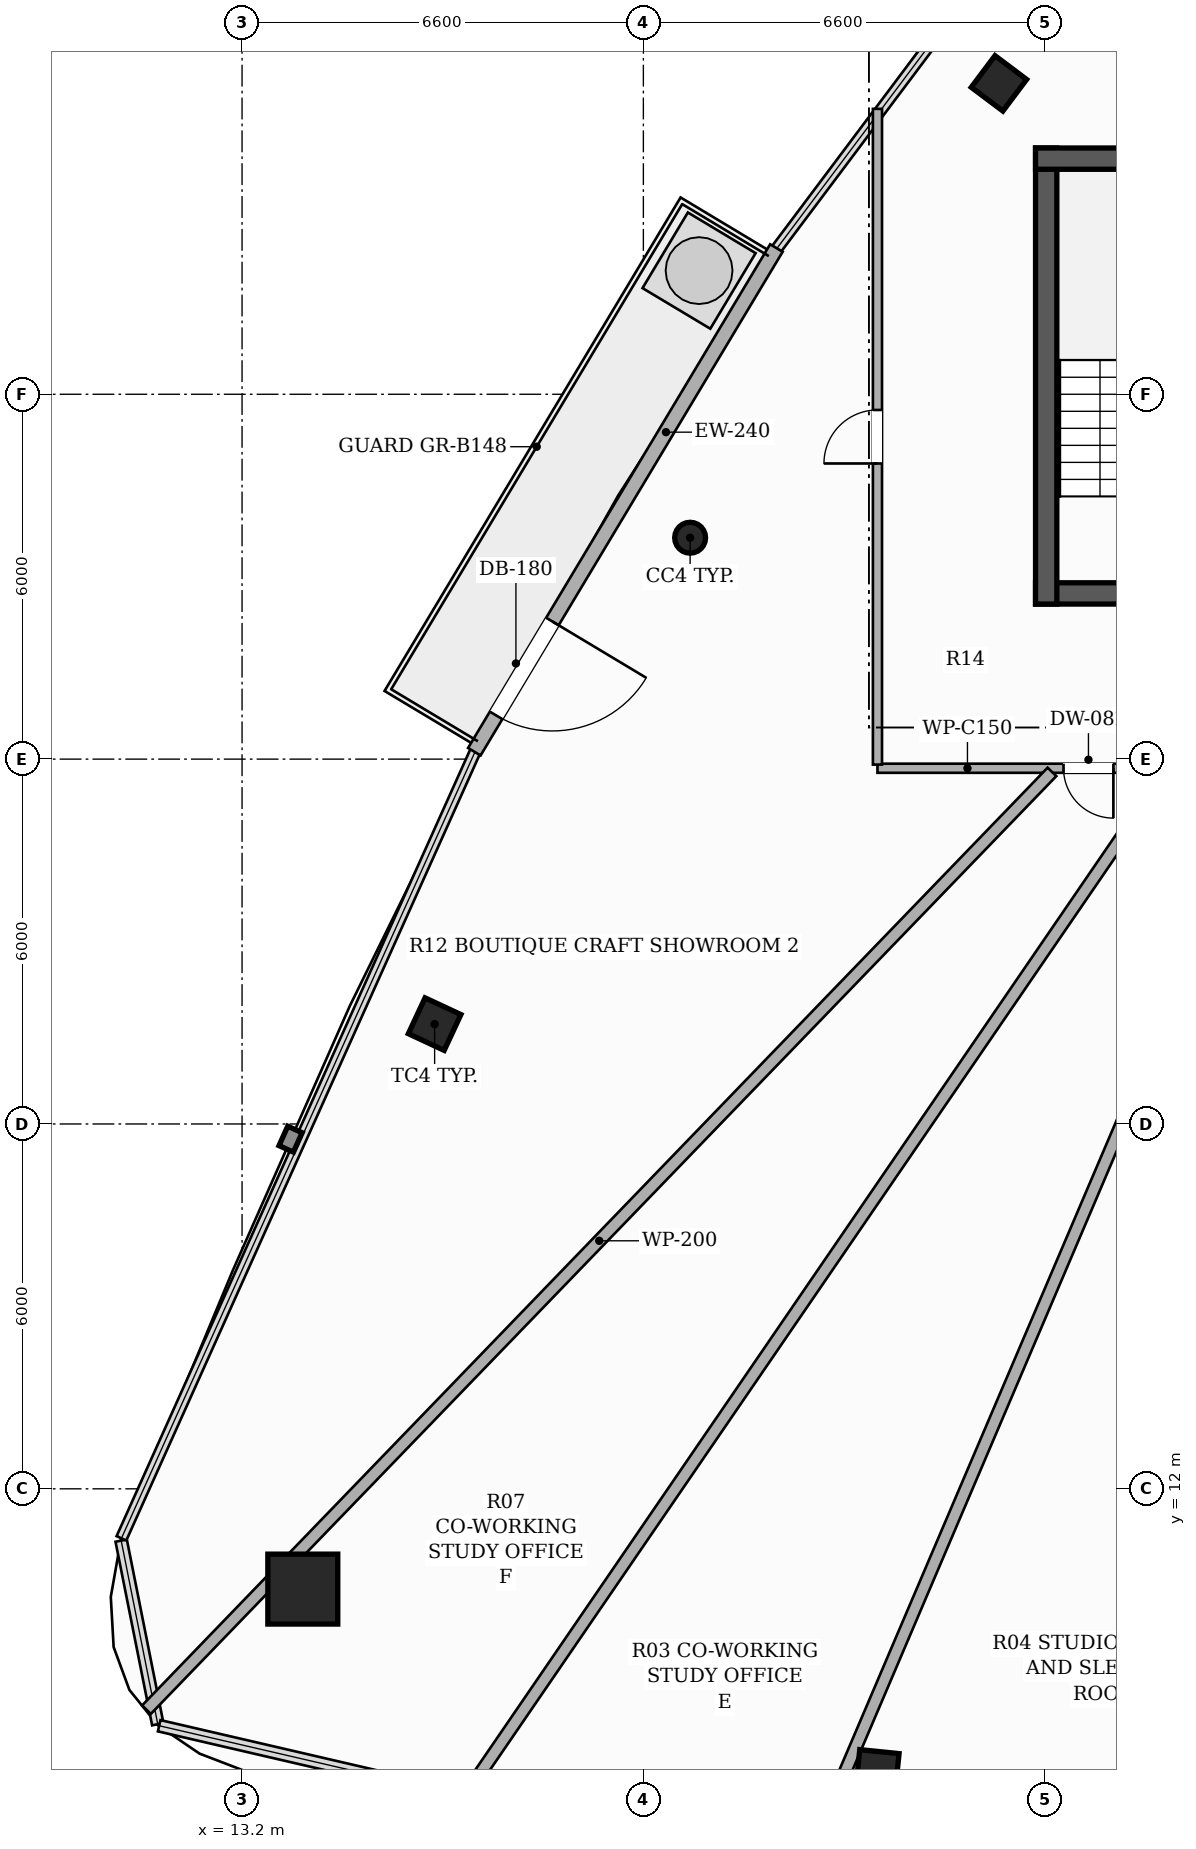
"""IFC4 building model, lengths in metres.
Left out: names, types, materials, properties, quantities, classifications, styles, units other than length and angle.
Written with IfcOpenShell. Run it as: python <this file> out.ifc"""

import sys

from ifc_helpers import new_model, si_unit, direction, frame, frame_2d, origin, origin_2d, place, context, subcontext, project, spatial, rectangle, hollow_rectangle, hollow_circle, extrude, element, fill, save


model = new_model("IFC4")
c1 = context("Model", 3, precision=1e-05, world=origin(), true_north=direction((0.0, 1.0)))
c2 = subcontext(c1, "Body", "Model", "MODEL_VIEW")
j1 = project(units=[si_unit("LENGTHUNIT", "METRE"), si_unit("PLANEANGLEUNIT", "RADIAN")], contexts=[c1])
p1 = place(None, origin())
s1 = spatial("IfcSite", under=j1, at=p1, CompositionType="ELEMENT")
p2 = place(p1, origin())
s2 = spatial("IfcBuilding", under=s1, at=p2, CompositionType="ELEMENT")
p3 = place(p2, frame((0.0, 0.0, 260.15)))
s3 = spatial("IfcBuildingStorey", under=s2, at=p3, CompositionType="ELEMENT", Elevation=260.15)
p4 = place(p3, frame((26.25, 26.725, 0.0), z_axis=(0.0, 0.0, 1.0), x_axis=(1.0, 0.0, 0.0)))
e1 = element("IfcWall", 1, at=p4, inside=s3, PredefinedType="SHEAR", context=c2, shape_type="SweptSolid", body=[
    extrude(rectangle(XDim=13.5, YDim=0.35, at=frame_2d((6.75, 0.0))), origin(), (0.0, 0.0, 1.0), 3.3),
])
p5 = place(p4, frame((4.35, 0.0, 0.0)))
e2 = element("IfcOpeningElement", 2, at=p5, cuts=e1, PredefinedType="OPENING", context=c2, shape_type="SweptSolid", body=[
    extrude(rectangle(XDim=1.05, YDim=2.15, at=frame_2d((0.525, 1.075))), frame((0.0, 0.185, 0.0), z_axis=(0.0, -1.0, 0.0), x_axis=(1.0, 0.0, 0.0)), (0.0, 0.0, 1.0), 0.37),
])
p6 = place(p4, frame((8.3, 0.0, 0.0)))
e3 = element("IfcOpeningElement", 3, at=p6, cuts=e1, PredefinedType="OPENING", context=c2, shape_type="SweptSolid", body=[
    extrude(rectangle(XDim=1.05, YDim=2.15, at=frame_2d((0.525, 1.075))), frame((0.0, 0.185, 0.0), z_axis=(0.0, -1.0, 0.0), x_axis=(1.0, 0.0, 0.0)), (0.0, 0.0, 1.0), 0.37),
])
p7 = place(p3, frame((26.425, 26.55, 0.0), z_axis=(0.0, 0.0, 1.0), x_axis=(0.0, 1.0, 0.0)))
e4 = element("IfcWall", 4, at=p7, inside=s3, PredefinedType="SHEAR", context=c2, shape_type="SweptSolid", body=[
    extrude(rectangle(XDim=7.5, YDim=0.35, at=frame_2d((3.75, 0.0))), origin(), (0.0, 0.0, 1.0), 3.3),
])
p8 = place(p3, frame((26.25, 33.875, 0.0), z_axis=(0.0, 0.0, 1.0), x_axis=(1.0, 0.0, 0.0)))
e5 = element("IfcWall", 5, at=p8, inside=s3, PredefinedType="SHEAR", context=c2, shape_type="SweptSolid", body=[
    extrude(rectangle(XDim=3.6, YDim=0.35, at=frame_2d((1.8, 0.0))), origin(), (0.0, 0.0, 1.0), 3.3),
])
p9 = place(p3, frame((14.199, 10.351, 0.0), z_axis=(0.0, 0.0, 1.0), x_axis=(1.0, 0.0, 0.0)))
e6 = element("IfcColumn", 6, at=p9, inside=s3, PredefinedType="COLUMN", context=c2, shape_type="SweptSolid", body=[
    extrude(hollow_rectangle(XDim=1.15, YDim=1.15, WallThickness=0.036, at=origin_2d()), origin(), (0.0, 0.0, 1.0), 3.3),
])
p10 = place(p3, frame((25.648, 35.113, 0.0), z_axis=(0.0, 0.0, 1.0), x_axis=(0.600420225326, 0.799684658487, 0.0)))
e7 = element("IfcColumn", 7, at=p10, inside=s3, PredefinedType="COLUMN", context=c2, shape_type="SweptSolid", body=[
    extrude(hollow_rectangle(XDim=0.65, YDim=0.65, WallThickness=0.022, at=origin_2d()), origin(), (0.0, 0.0, 1.0), 3.3),
])
p11 = place(p3, frame((20.569, 27.641, 0.0), z_axis=(0.0, 0.0, 1.0), x_axis=(1.0, 0.0, 0.0)))
e8 = element("IfcColumn", 8, at=p11, inside=s3, PredefinedType="COLUMN", context=c2, shape_type="SweptSolid", body=[
    extrude(hollow_circle(Radius=0.254, WallThickness=0.016, at=origin_2d()), origin(), (0.0, 0.0, 1.0), 3.3),
])
for number, where, z_axis, x_axis in (
    (9, (16.367, 19.642, 0.0), (0.0, 0.0, 1.0), (0.423, 0.906, 0.0)),
    (10, (23.649, 7.355, 0.0), (0.0, 0.0, 1.0), (-0.995, 0.101, 0.0)),
):
    element("IfcColumn", number, at=place(p3, frame(where, z_axis=z_axis, x_axis=x_axis)), inside=s3, PredefinedType="COLUMN", context=c2, shape_type="SweptSolid", body=[
        extrude(hollow_rectangle(XDim=0.65, YDim=0.65, WallThickness=0.022, at=origin_2d()), origin(), (0.0, 0.0, 1.0), 3.3),
    ])
p12 = place(p3, frame((21.988, 32.405, 0.0), z_axis=(0.0, 0.0, 1.0), x_axis=(-0.514361929684, -0.857573206958, 0.0)))
e11 = element("IfcWall", 11, at=p12, inside=s3, PredefinedType="SOLIDWALL", context=c2, shape_type="SweptSolid", body=[
    extrude(rectangle(XDim=9.659, YDim=0.24, at=frame_2d((4.829, 0.0))), origin(), (0.0, 0.0, 1.0), 2.624),
])
p13 = place(p12, frame((7.162, 0.0, 0.0)))
e12 = element("IfcOpeningElement", 12, at=p13, cuts=e11, PredefinedType="OPENING", context=c2, shape_type="SweptSolid", body=[
    extrude(rectangle(XDim=1.8, YDim=2.2, at=frame_2d((0.9, 1.1))), frame((0.0, 0.13, 0.0), z_axis=(0.0, -1.0, 0.0), x_axis=(1.0, 0.0, 0.0)), (0.0, 0.0, 1.0), 0.26),
])
p14 = place(p3, frame((32.168, 23.85, 0.0), z_axis=(0.0, 0.0, 1.0), x_axis=(-1.0, 0.0, 0.0)))
e13 = element("IfcWall", 13, at=p14, inside=s3, PredefinedType="PARTITIONING", context=c2, shape_type="SweptSolid", body=[
    extrude(rectangle(XDim=8.518, YDim=0.15, at=frame_2d((4.259, 0.0))), origin(), (0.0, 0.0, 1.0), 2.565),
])
p15 = place(p14, frame((0.894, 0.0, 0.0)))
e14 = element("IfcOpeningElement", 14, at=p15, cuts=e13, PredefinedType="OPENING", context=c2, shape_type="SweptSolid", body=[
    extrude(rectangle(XDim=0.92, YDim=2.15, at=frame_2d((0.46, 1.075))), frame((0.0, 0.085, 0.0), z_axis=(0.0, -1.0, 0.0), x_axis=(1.0, 0.0, 0.0)), (0.0, 0.0, 1.0), 0.17),
])
p16 = place(p14, frame((2.683, 0.0, 0.0)))
e15 = element("IfcOpeningElement", 15, at=p16, cuts=e13, PredefinedType="OPENING", context=c2, shape_type="SweptSolid", body=[
    extrude(rectangle(XDim=0.88, YDim=2.1, at=frame_2d((0.44, 1.05))), frame((0.0, 0.085, 0.0), z_axis=(0.0, -1.0, 0.0), x_axis=(1.0, 0.0, 0.0)), (0.0, 0.0, 1.0), 0.17),
])
p17 = place(p14, frame((4.638, 0.0, 0.0)))
e16 = element("IfcOpeningElement", 16, at=p17, cuts=e13, PredefinedType="OPENING", context=c2, shape_type="SweptSolid", body=[
    extrude(rectangle(XDim=0.82, YDim=2.1, at=frame_2d((0.41, 1.05))), frame((0.0, 0.085, 0.0), z_axis=(0.0, -1.0, 0.0), x_axis=(1.0, 0.0, 0.0)), (0.0, 0.0, 1.0), 0.17),
])
p18 = place(p3, frame((23.65, 23.91, 0.0), z_axis=(0.0, 0.0, 1.0), x_axis=(0.0, 1.0, 0.0)))
e17 = element("IfcWall", 17, at=p18, inside=s3, PredefinedType="PARTITIONING", context=c2, shape_type="SweptSolid", body=[
    extrude(rectangle(XDim=10.784, YDim=0.15, at=frame_2d((5.392, 0.0))), origin(), (0.0, 0.0, 1.0), 2.492),
])
p19 = place(p18, frame((4.952, 0.0, 0.0)))
e18 = element("IfcOpeningElement", 18, at=p19, cuts=e17, PredefinedType="OPENING", context=c2, shape_type="SweptSolid", body=[
    extrude(rectangle(XDim=0.88, YDim=2.1, at=frame_2d((0.44, 1.05))), frame((0.0, 0.085, 0.0), z_axis=(0.0, -1.0, 0.0), x_axis=(1.0, 0.0, 0.0)), (0.0, 0.0, 1.0), 0.17),
])
p20 = place(p3, frame((26.52, 23.79, 0.0), z_axis=(0.0, 0.0, 1.0), x_axis=(-0.694637190704, -0.719360252788, 0.0)))
e19 = element("IfcWall", 19, at=p20, inside=s3, PredefinedType="PARTITIONING", context=c2, shape_type="SweptSolid", body=[
    extrude(rectangle(XDim=21.439, YDim=0.2, at=frame_2d((10.719, 0.0))), origin(), (0.0, 0.0, 1.0), 2.492),
])
p21 = place(p3, frame((22.589, 6.104, 0.0), z_axis=(0.0, 0.0, 1.0), x_axis=(0.392518309842, 0.919744190761, 0.0)))
e20 = element("IfcWall", 20, at=p21, inside=s3, PredefinedType="PARTITIONING", context=c2, shape_type="SweptSolid", body=[
    extrude(rectangle(XDim=19.229, YDim=0.2, at=frame_2d((9.615, 0.0))), origin(), (0.0, 0.0, 1.0), 2.492),
])
p22 = place(p3, frame((16.784, 6.834, 0.0), z_axis=(0.0, 0.0, 1.0), x_axis=(0.565235631435, 0.824929500598, 0.0)))
e21 = element("IfcWall", 21, at=p22, inside=s3, PredefinedType="PARTITIONING", context=c2, shape_type="SweptSolid", body=[
    extrude(rectangle(XDim=20.554, YDim=0.2, at=frame_2d((10.277, 0.0))), origin(), (0.0, 0.0, 1.0), 2.492),
])
p23 = place(p13, origin())
e22 = element("IfcDoor", 22, at=p23, inside=s3, OperationType="SINGLE_SWING_LEFT", PredefinedType="DOOR", context=c2, shape_type="SweptSolid", body=[
    extrude(rectangle(XDim=1.8, YDim=2.2, at=frame_2d((0.9, 1.1))), frame((0.0, 0.025, 0.0), z_axis=(0.0, -1.0, 0.0), x_axis=(1.0, 0.0, 0.0)), (0.0, 0.0, 1.0), 0.05),
])
fill(e12, e22)
p24 = place(p19, origin())
e23 = element("IfcDoor", 23, at=p24, inside=s3, OperationType="SINGLE_SWING_LEFT", PredefinedType="DOOR", context=c2, shape_type="SweptSolid", body=[
    extrude(rectangle(XDim=0.88, YDim=2.1, at=frame_2d((0.44, 1.05))), frame((0.0, 0.025, 0.0), z_axis=(0.0, -1.0, 0.0), x_axis=(1.0, 0.0, 0.0)), (0.0, 0.0, 1.0), 0.05),
])
fill(e18, e23)
p25 = place(p17, origin())
e24 = element("IfcDoor", 24, at=p25, inside=s3, OperationType="SINGLE_SWING_LEFT", PredefinedType="DOOR", context=c2, shape_type="SweptSolid", body=[
    extrude(rectangle(XDim=0.82, YDim=2.1, at=frame_2d((0.41, 1.05))), frame((0.0, 0.025, 0.0), z_axis=(0.0, -1.0, 0.0), x_axis=(1.0, 0.0, 0.0)), (0.0, 0.0, 1.0), 0.05),
])
fill(e16, e24)
save(model, sys.argv[1])
